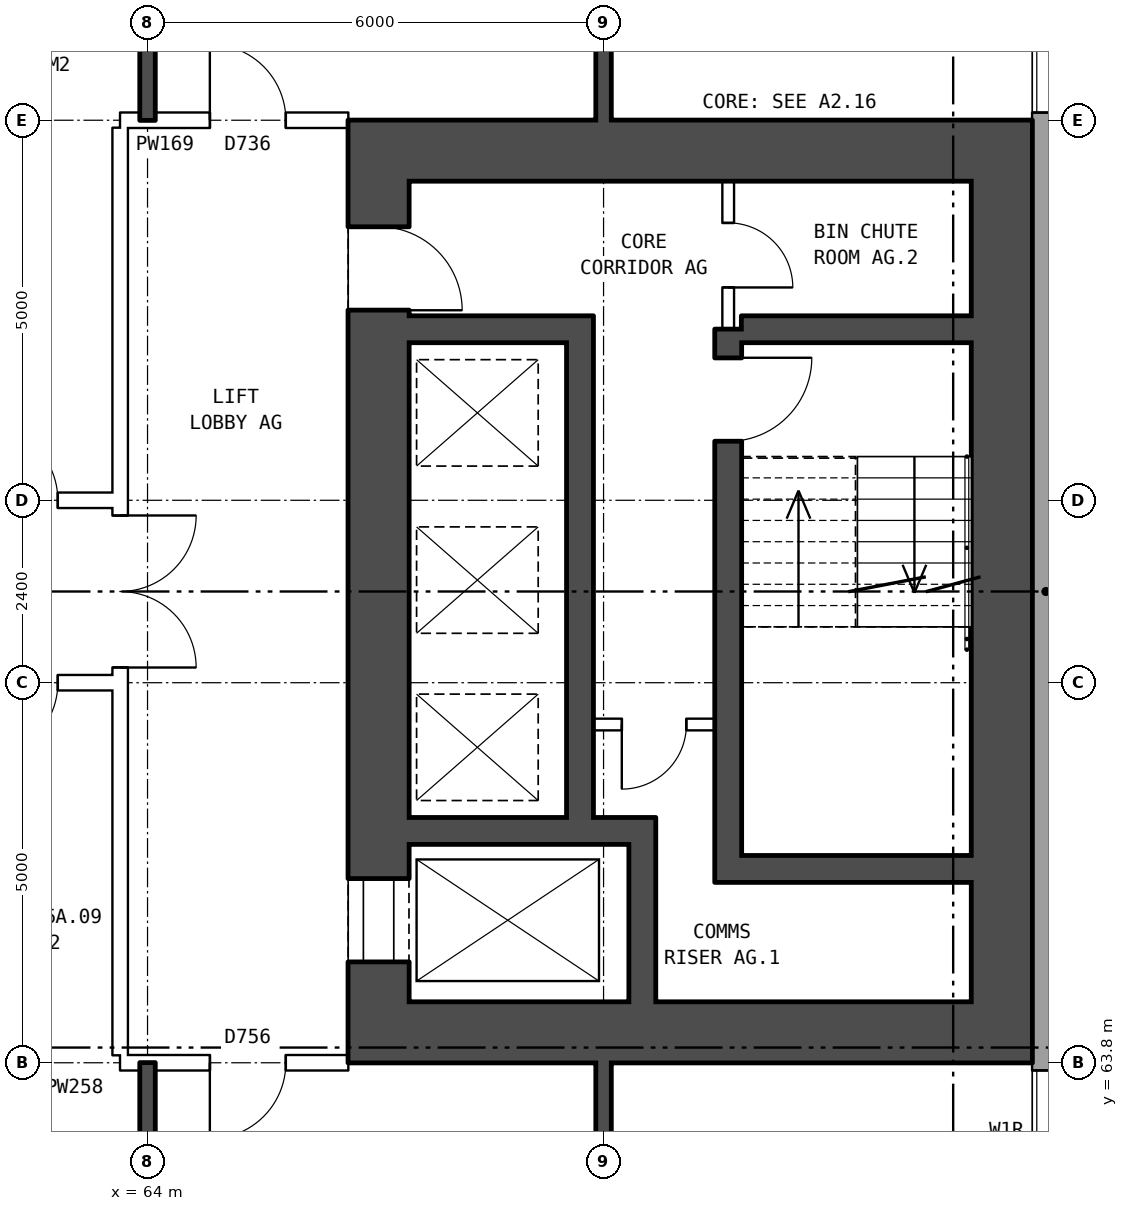
"""IFC4 building model, lengths in metres.
Left out: names, types, materials, properties, quantities, classifications, styles, units other than length and angle.
Written with IfcOpenShell. Run it as: python <this file> out.ifc"""

import sys

from ifc_helpers import new_model, si_unit, direction, frame, frame_2d, origin, place, context, subcontext, project, spatial, rectangle, extrude, element, fill, save


model = new_model("IFC4")
c1 = context("Model", 3, precision=1e-05, world=origin(), true_north=direction((0.0, 1.0)))
c2 = subcontext(c1, "Body", "Model", "MODEL_VIEW")
j1 = project(units=[si_unit("LENGTHUNIT", "METRE"), si_unit("PLANEANGLEUNIT", "RADIAN")], contexts=[c1])
p1 = place(None, origin())
s1 = spatial("IfcSite", under=j1, at=p1, CompositionType="ELEMENT")
p2 = place(p1, origin())
s2 = spatial("IfcBuilding", under=s1, at=p2, CompositionType="ELEMENT")
p3 = place(p2, frame((0.0, 0.0, 56.7)))
s3 = spatial("IfcBuildingStorey", under=s2, at=p3, CompositionType="ELEMENT", Elevation=56.7)
p4 = place(p3, frame((75.82, 57.075, 0.0), z_axis=(0.0, 0.0, 1.0), x_axis=(0.0, 1.0, 0.0)))
e1 = element("IfcWall", 1, at=p4, inside=s3, PredefinedType="STANDARD", context=c2, shape_type="SweptSolid", body=[
    extrude(rectangle(XDim=25.851, YDim=0.36, at=frame_2d((12.925, 0.0))), origin(), (0.0, 0.0, 1.0), 2.85),
])
p5 = place(p4, frame((1.075, 0.0, 0.8)))
e2 = element("IfcOpeningElement", 2, at=p5, cuts=e1, PredefinedType="OPENING", context=c2, shape_type="SweptSolid", body=[
    extrude(rectangle(XDim=1.2, YDim=1.8, at=frame_2d((0.6, 0.9))), frame((0.0, 0.19, 0.0), z_axis=(0.0, -1.0, 0.0), x_axis=(1.0, 0.0, 0.0)), (0.0, 0.0, 1.0), 0.38),
])
p6 = place(p4, frame((2.575, 0.0, 0.8)))
e3 = element("IfcOpeningElement", 3, at=p6, cuts=e1, PredefinedType="OPENING", context=c2, shape_type="SweptSolid", body=[
    extrude(rectangle(XDim=1.2, YDim=0.9, at=frame_2d((0.6, 0.45))), frame((0.0, 0.19, 0.0), z_axis=(0.0, -1.0, 0.0), x_axis=(1.0, 0.0, 0.0)), (0.0, 0.0, 1.0), 0.38),
])
p7 = place(p4, frame((19.225, 0.0, 1.7)))
e4 = element("IfcOpeningElement", 4, at=p7, cuts=e1, PredefinedType="OPENING", context=c2, shape_type="SweptSolid", body=[
    extrude(rectangle(XDim=1.6, YDim=0.9, at=frame_2d((0.8, 0.45))), frame((0.0, 0.19, 0.0), z_axis=(0.0, -1.0, 0.0), x_axis=(1.0, 0.0, 0.0)), (0.0, 0.0, 1.0), 0.38),
])
p8 = place(p4, frame((22.025, 0.0, 0.8)))
e5 = element("IfcOpeningElement", 5, at=p8, cuts=e1, PredefinedType="OPENING", context=c2, shape_type="SweptSolid", body=[
    extrude(rectangle(XDim=1.2, YDim=0.9, at=frame_2d((0.6, 0.45))), frame((0.0, 0.19, 0.0), z_axis=(0.0, -1.0, 0.0), x_axis=(1.0, 0.0, 0.0)), (0.0, 0.0, 1.0), 0.38),
])
p9 = place(p4, frame((5.025, 0.0, 1.7)))
e6 = element("IfcOpeningElement", 6, at=p9, cuts=e1, PredefinedType="OPENING", context=c2, shape_type="SweptSolid", body=[
    extrude(rectangle(XDim=1.6, YDim=0.9, at=frame_2d((0.8, 0.45))), frame((0.0, 0.19, 0.0), z_axis=(0.0, -1.0, 0.0), x_axis=(1.0, 0.0, 0.0)), (0.0, 0.0, 1.0), 0.38),
])
p10 = place(p4, frame((23.525, 0.0, 0.8)))
e7 = element("IfcOpeningElement", 7, at=p10, cuts=e1, PredefinedType="OPENING", context=c2, shape_type="SweptSolid", body=[
    extrude(rectangle(XDim=1.2, YDim=1.8, at=frame_2d((0.6, 0.9))), frame((0.0, 0.19, 0.0), z_axis=(0.0, -1.0, 0.0), x_axis=(1.0, 0.0, 0.0)), (0.0, 0.0, 1.0), 0.38),
])
p11 = place(p3, frame((67.04, 64.6, 0.0), z_axis=(0.0, 0.0, 1.0), x_axis=(0.0, 1.0, 0.0)))
e8 = element("IfcWall", 8, at=p11, inside=s3, PredefinedType="SHEAR", context=c2, shape_type="SweptSolid", body=[
    extrude(rectangle(XDim=10.8, YDim=0.8, at=frame_2d((5.4, 0.0))), origin(), (0.0, 0.0, 1.0), 2.85),
])
p12 = place(p11, frame((0.525, 0.0, 0.0)))
e9 = element("IfcOpeningElement", 9, at=p12, cuts=e8, PredefinedType="OPENING", context=c2, shape_type="SweptSolid", body=[
    extrude(rectangle(XDim=1.1, YDim=2.1, at=frame_2d((0.55, 1.05))), frame((0.0, 0.41, 0.0), z_axis=(0.0, -1.0, 0.0), x_axis=(1.0, 0.0, 0.0)), (0.0, 0.0, 1.0), 0.82),
])
p13 = place(p11, frame((9.1, 0.0, 0.0)))
e10 = element("IfcOpeningElement", 10, at=p13, cuts=e8, PredefinedType="OPENING", context=c2, shape_type="SweptSolid", body=[
    extrude(rectangle(XDim=1.1, YDim=2.1, at=frame_2d((0.55, 1.05))), frame((0.0, 0.41, 0.0), z_axis=(0.0, -1.0, 0.0), x_axis=(1.0, 0.0, 0.0)), (0.0, 0.0, 1.0), 0.82),
])
p14 = place(p3, frame((75.24, 64.6, 0.0), z_axis=(0.0, 0.0, 1.0), x_axis=(0.0, 1.0, 0.0)))
e11 = element("IfcWall", 11, at=p14, inside=s3, PredefinedType="SHEAR", context=c2, shape_type="SweptSolid", body=[
    extrude(rectangle(XDim=10.8, YDim=0.8, at=frame_2d((5.4, 0.0))), origin(), (0.0, 0.0, 1.0), 2.85),
])
for number, where, z_axis, x_axis in (
    (12, (66.64, 64.2, 0.0), (0.0, 0.0, 1.0), (1.0, 0.0, 0.0)),
    (13, (66.64, 75.8, 0.0), (0.0, 0.0, 1.0), (1.0, 0.0, 0.0)),
):
    element("IfcWall", number, at=place(p3, frame(where, z_axis=z_axis, x_axis=x_axis)), inside=s3, PredefinedType="SHEAR", context=c2, shape_type="SweptSolid", body=[
        extrude(rectangle(XDim=9.0, YDim=0.8, at=frame_2d((4.5, 0.0))), origin(), (0.0, 0.0, 1.0), 2.85),
    ])
p15 = place(p3, frame((71.815, 66.35, 0.0), z_axis=(0.0, 0.0, 1.0), x_axis=(1.0, 0.0, 0.0)))
e14 = element("IfcWall", 14, at=p15, inside=s3, PredefinedType="SHEAR", context=c2, shape_type="SweptSolid", body=[
    extrude(rectangle(XDim=3.025, YDim=0.35, at=frame_2d((1.513, 0.0))), origin(), (0.0, 0.0, 1.0), 2.85),
])
p16 = place(p3, frame((67.44, 66.85, 0.0), z_axis=(0.0, 0.0, 1.0), x_axis=(1.0, 0.0, 0.0)))
e15 = element("IfcWall", 15, at=p16, inside=s3, PredefinedType="SHEAR", context=c2, shape_type="SweptSolid", body=[
    extrude(rectangle(XDim=3.245, YDim=0.35, at=frame_2d((1.623, 0.0))), origin(), (0.0, 0.0, 1.0), 2.85),
])
p17 = place(p3, frame((69.865, 68.25, 0.0), z_axis=(0.0, 0.0, 1.0), x_axis=(1.0, 0.0, 0.0)))
e16 = element("IfcWall", 16, at=p17, inside=s3, PredefinedType="PARTITIONING", context=c2, shape_type="SweptSolid", body=[
    extrude(rectangle(XDim=1.6, YDim=0.15, at=frame_2d((0.8, 0.0))), origin(), (0.0, 0.0, 1.0), 2.85),
])
p18 = place(p17, frame((0.375, 0.0, 0.0)))
e17 = element("IfcOpeningElement", 17, at=p18, cuts=e16, PredefinedType="OPENING", context=c2, shape_type="SweptSolid", body=[
    extrude(rectangle(XDim=0.85, YDim=2.1, at=frame_2d((0.425, 1.05))), frame((0.0, 0.085, 0.0), z_axis=(0.0, -1.0, 0.0), x_axis=(1.0, 0.0, 0.0)), (0.0, 0.0, 1.0), 0.17),
])
p19 = place(p3, frame((67.44, 73.45, 0.0), z_axis=(0.0, 0.0, 1.0), x_axis=(1.0, 0.0, 0.0)))
e18 = element("IfcWall", 18, at=p19, inside=s3, PredefinedType="SHEAR", context=c2, shape_type="SweptSolid", body=[
    extrude(rectangle(XDim=2.075, YDim=0.35, at=frame_2d((1.038, 0.0))), origin(), (0.0, 0.0, 1.0), 2.85),
])
p20 = place(p3, frame((71.815, 73.45, 0.0), z_axis=(0.0, 0.0, 1.0), x_axis=(1.0, 0.0, 0.0)))
e19 = element("IfcWall", 19, at=p20, inside=s3, PredefinedType="SHEAR", context=c2, shape_type="SweptSolid", body=[
    extrude(rectangle(XDim=3.025, YDim=0.35, at=frame_2d((1.513, 0.0))), origin(), (0.0, 0.0, 1.0), 2.85),
])
p21 = place(p3, frame((69.69, 67.025, 0.0), z_axis=(0.0, 0.0, 1.0), x_axis=(0.0, 1.0, 0.0)))
e20 = element("IfcWall", 20, at=p21, inside=s3, PredefinedType="SHEAR", context=c2, shape_type="SweptSolid", body=[
    extrude(rectangle(XDim=6.6, YDim=0.35, at=frame_2d((3.3, 0.0))), origin(), (0.0, 0.0, 1.0), 2.85),
])
p22 = place(p3, frame((70.51, 64.6, 0.0), z_axis=(0.0, 0.0, 1.0), x_axis=(0.0, 1.0, 0.0)))
e21 = element("IfcWall", 21, at=p22, inside=s3, PredefinedType="SHEAR", context=c2, shape_type="SweptSolid", body=[
    extrude(rectangle(XDim=2.075, YDim=0.35, at=frame_2d((1.038, 0.0))), origin(), (0.0, 0.0, 1.0), 2.85),
])
p23 = place(p3, frame((71.64, 66.175, 0.0), z_axis=(0.0, 0.0, 1.0), x_axis=(0.0, 1.0, 0.0)))
e22 = element("IfcWall", 22, at=p23, inside=s3, PredefinedType="SHEAR", context=c2, shape_type="SweptSolid", body=[
    extrude(rectangle(XDim=7.275, YDim=0.35, at=frame_2d((3.637, 0.0))), origin(), (0.0, 0.0, 1.0), 2.85),
])
p24 = place(p23, frame((5.8, 0.0, 0.0)))
e23 = element("IfcOpeningElement", 23, at=p24, cuts=e22, PredefinedType="OPENING", context=c2, shape_type="SweptSolid", body=[
    extrude(rectangle(XDim=1.1, YDim=2.1, at=frame_2d((0.55, 1.05))), frame((0.0, 0.185, 0.0), z_axis=(0.0, -1.0, 0.0), x_axis=(1.0, 0.0, 0.0)), (0.0, 0.0, 1.0), 0.37),
])
p25 = place(p3, frame((71.64, 73.45, 0.0), z_axis=(0.0, 0.0, 1.0), x_axis=(0.0, 1.0, 0.0)))
e24 = element("IfcWall", 24, at=p25, inside=s3, PredefinedType="PARTITIONING", context=c2, shape_type="SweptSolid", body=[
    extrude(rectangle(XDim=1.95, YDim=0.15, at=frame_2d((0.975, 0.0))), origin(), (0.0, 0.0, 1.0), 2.85),
])
p26 = place(p25, frame((0.55, 0.0, 0.0)))
e25 = element("IfcOpeningElement", 25, at=p26, cuts=e24, PredefinedType="OPENING", context=c2, shape_type="SweptSolid", body=[
    extrude(rectangle(XDim=0.85, YDim=2.1, at=frame_2d((0.425, 1.05))), frame((0.0, 0.085, 0.0), z_axis=(0.0, -1.0, 0.0), x_axis=(1.0, 0.0, 0.0)), (0.0, 0.0, 1.0), 0.17),
])
p27 = place(p3, frame((63.64, 63.9, 0.0), z_axis=(0.0, 0.0, 1.0), x_axis=(0.0, 1.0, 0.0)))
e26 = element("IfcWall", 26, at=p27, inside=s3, PredefinedType="PARTITIONING", context=c2, shape_type="SweptSolid", body=[
    extrude(rectangle(XDim=12.2, YDim=0.2, at=frame_2d((6.1, 0.0))), origin(), (0.0, 0.0, 1.0), 2.85),
])
p28 = place(p27, frame((5.1, 0.0, 0.0)))
e27 = element("IfcOpeningElement", 27, at=p28, cuts=e26, PredefinedType="OPENING", context=c2, shape_type="SweptSolid", body=[
    extrude(rectangle(XDim=2.0, YDim=2.1, at=frame_2d((1.0, 1.05))), frame((0.0, 0.11, 0.0), z_axis=(0.0, -1.0, 0.0), x_axis=(1.0, 0.0, 0.0)), (0.0, 0.0, 1.0), 0.22),
])
p29 = place(p3, frame((63.64, 63.8, 0.0), z_axis=(0.0, 0.0, 1.0), x_axis=(1.0, 0.0, 0.0)))
e28 = element("IfcWall", 28, at=p29, inside=s3, PredefinedType="PARTITIONING", context=c2, shape_type="SweptSolid", body=[
    extrude(rectangle(XDim=3.0, YDim=0.2, at=frame_2d((1.5, 0.0))), origin(), (0.0, 0.0, 1.0), 2.85),
])
p30 = place(p29, frame((1.18, 0.0, 0.0)))
e29 = element("IfcOpeningElement", 29, at=p30, cuts=e28, PredefinedType="OPENING", context=c2, shape_type="SweptSolid", body=[
    extrude(rectangle(XDim=1.0, YDim=2.1, at=frame_2d((0.5, 1.05))), frame((0.0, 0.11, 0.0), z_axis=(0.0, -1.0, 0.0), x_axis=(1.0, 0.0, 0.0)), (0.0, 0.0, 1.0), 0.22),
])
p31 = place(p3, frame((44.36, 68.8, 0.0), z_axis=(0.0, 0.0, 1.0), x_axis=(1.0, 0.0, 0.0)))
e30 = element("IfcWall", 30, at=p31, inside=s3, PredefinedType="PARTITIONING", context=c2, shape_type="SweptSolid", body=[
    extrude(rectangle(XDim=19.28, YDim=0.2, at=frame_2d((9.64, 0.0))), origin(), (0.0, 0.0, 1.0), 2.85),
])
p32 = place(p31, frame((17.46, 0.0, 0.0)))
e31 = element("IfcOpeningElement", 31, at=p32, cuts=e30, PredefinedType="OPENING", context=c2, shape_type="SweptSolid", body=[
    extrude(rectangle(XDim=1.0, YDim=2.1, at=frame_2d((0.5, 1.05))), frame((0.0, 0.11, 0.0), z_axis=(0.0, -1.0, 0.0), x_axis=(1.0, 0.0, 0.0)), (0.0, 0.0, 1.0), 0.22),
])
p33 = place(p31, frame((11.64, 0.0, 0.0)))
e32 = element("IfcOpeningElement", 32, at=p33, cuts=e30, PredefinedType="OPENING", context=c2, shape_type="SweptSolid", body=[
    extrude(rectangle(XDim=1.0, YDim=2.1, at=frame_2d((0.5, 1.05))), frame((0.0, 0.11, 0.0), z_axis=(0.0, -1.0, 0.0), x_axis=(1.0, 0.0, 0.0)), (0.0, 0.0, 1.0), 0.22),
])
p34 = place(p31, frame((2.64, 0.0, 0.0)))
e33 = element("IfcOpeningElement", 33, at=p34, cuts=e30, PredefinedType="OPENING", context=c2, shape_type="SweptSolid", body=[
    extrude(rectangle(XDim=1.0, YDim=2.1, at=frame_2d((0.5, 1.05))), frame((0.0, 0.11, 0.0), z_axis=(0.0, -1.0, 0.0), x_axis=(1.0, 0.0, 0.0)), (0.0, 0.0, 1.0), 0.22),
])
p35 = place(p3, frame((44.36, 71.2, 0.0), z_axis=(0.0, 0.0, 1.0), x_axis=(1.0, 0.0, 0.0)))
e34 = element("IfcWall", 34, at=p35, inside=s3, PredefinedType="PARTITIONING", context=c2, shape_type="SweptSolid", body=[
    extrude(rectangle(XDim=19.28, YDim=0.2, at=frame_2d((9.64, 0.0))), origin(), (0.0, 0.0, 1.0), 2.85),
])
p36 = place(p35, frame((17.46, 0.0, 0.0)))
e35 = element("IfcOpeningElement", 35, at=p36, cuts=e34, PredefinedType="OPENING", context=c2, shape_type="SweptSolid", body=[
    extrude(rectangle(XDim=1.0, YDim=2.1, at=frame_2d((0.5, 1.05))), frame((0.0, 0.11, 0.0), z_axis=(0.0, -1.0, 0.0), x_axis=(1.0, 0.0, 0.0)), (0.0, 0.0, 1.0), 0.22),
])
p37 = place(p35, frame((8.64, 0.0, 0.0)))
e36 = element("IfcOpeningElement", 36, at=p37, cuts=e34, PredefinedType="OPENING", context=c2, shape_type="SweptSolid", body=[
    extrude(rectangle(XDim=1.0, YDim=2.1, at=frame_2d((0.5, 1.05))), frame((0.0, 0.11, 0.0), z_axis=(0.0, -1.0, 0.0), x_axis=(1.0, 0.0, 0.0)), (0.0, 0.0, 1.0), 0.22),
])
p38 = place(p35, frame((5.64, 0.0, 0.0)))
e37 = element("IfcOpeningElement", 37, at=p38, cuts=e34, PredefinedType="OPENING", context=c2, shape_type="SweptSolid", body=[
    extrude(rectangle(XDim=1.0, YDim=2.1, at=frame_2d((0.5, 1.05))), frame((0.0, 0.11, 0.0), z_axis=(0.0, -1.0, 0.0), x_axis=(1.0, 0.0, 0.0)), (0.0, 0.0, 1.0), 0.22),
])
p39 = place(p3, frame((63.64, 76.2, 0.0), z_axis=(0.0, 0.0, 1.0), x_axis=(1.0, 0.0, 0.0)))
e38 = element("IfcWall", 38, at=p39, inside=s3, PredefinedType="PARTITIONING", context=c2, shape_type="SweptSolid", body=[
    extrude(rectangle(XDim=3.0, YDim=0.2, at=frame_2d((1.5, 0.0))), origin(), (0.0, 0.0, 1.0), 2.85),
])
p40 = place(p39, frame((1.18, 0.0, 0.0)))
e39 = element("IfcOpeningElement", 39, at=p40, cuts=e38, PredefinedType="OPENING", context=c2, shape_type="SweptSolid", body=[
    extrude(rectangle(XDim=1.0, YDim=2.1, at=frame_2d((0.5, 1.05))), frame((0.0, 0.11, 0.0), z_axis=(0.0, -1.0, 0.0), x_axis=(1.0, 0.0, 0.0)), (0.0, 0.0, 1.0), 0.22),
])
for number, where, z_axis, x_axis in (
    (40, (64.0, 54.36, 0.0), (0.0, 0.0, 1.0), (0.0, 1.0, 0.0)),
    (41, (64.0, 76.2, 0.0), (0.0, 0.0, 1.0), (0.0, 1.0, 0.0)),
):
    element("IfcWall", number, at=place(p3, frame(where, z_axis=z_axis, x_axis=x_axis)), inside=s3, PredefinedType="SOLIDWALL", context=c2, shape_type="SweptSolid", body=[
        extrude(rectangle(XDim=9.44, YDim=0.2, at=frame_2d((4.72, 0.0))), origin(), (0.0, 0.0, 1.0), 2.85),
    ])
p41 = place(p3, frame((70.0, 54.36, 0.0), z_axis=(0.0, 0.0, 1.0), x_axis=(0.0, 1.0, 0.0)))
e42 = element("IfcWall", 42, at=p41, inside=s3, PredefinedType="SOLIDWALL", context=c2, shape_type="SweptSolid", body=[
    extrude(rectangle(XDim=9.44, YDim=0.2, at=frame_2d((4.72, 0.0))), origin(), (0.0, 0.0, 1.0), 2.85),
])
p42 = place(p41, frame((7.04, 0.0, 0.0)))
e43 = element("IfcOpeningElement", 43, at=p42, cuts=e42, PredefinedType="OPENING", context=c2, shape_type="SweptSolid", body=[
    extrude(rectangle(XDim=0.9, YDim=2.1, at=frame_2d((0.45, 1.05))), frame((0.0, 0.11, 0.0), z_axis=(0.0, -1.0, 0.0), x_axis=(1.0, 0.0, 0.0)), (0.0, 0.0, 1.0), 0.22),
])
p43 = place(p3, frame((70.0, 76.2, 0.0), z_axis=(0.0, 0.0, 1.0), x_axis=(0.0, 1.0, 0.0)))
e44 = element("IfcWall", 44, at=p43, inside=s3, PredefinedType="SOLIDWALL", context=c2, shape_type="SweptSolid", body=[
    extrude(rectangle(XDim=9.44, YDim=0.2, at=frame_2d((4.72, 0.0))), origin(), (0.0, 0.0, 1.0), 2.85),
])
p44 = place(p43, frame((7.17, 0.0, 0.0)))
e45 = element("IfcOpeningElement", 45, at=p44, cuts=e44, PredefinedType="OPENING", context=c2, shape_type="SweptSolid", body=[
    extrude(rectangle(XDim=0.9, YDim=2.1, at=frame_2d((0.45, 1.05))), frame((0.0, 0.11, 0.0), z_axis=(0.0, -1.0, 0.0), x_axis=(1.0, 0.0, 0.0)), (0.0, 0.0, 1.0), 0.22),
])
p45 = place(p43, frame((1.2, 0.0, 0.0)))
e46 = element("IfcOpeningElement", 46, at=p45, cuts=e44, PredefinedType="OPENING", context=c2, shape_type="SweptSolid", body=[
    extrude(rectangle(XDim=0.9, YDim=2.1, at=frame_2d((0.45, 1.05))), frame((0.0, 0.11, 0.0), z_axis=(0.0, -1.0, 0.0), x_axis=(1.0, 0.0, 0.0)), (0.0, 0.0, 1.0), 0.22),
])
p46 = place(p7, origin())
e47 = element("IfcWindow", 47, at=p46, inside=s3, PartitioningType="SINGLE_PANEL", PredefinedType="WINDOW", context=c2, shape_type="SweptSolid", body=[
    extrude(rectangle(XDim=1.6, YDim=0.9, at=frame_2d((0.8, 0.45))), frame((0.0, 0.15, 0.0), z_axis=(0.0, -1.0, 0.0), x_axis=(1.0, 0.0, 0.0)), (0.0, 0.0, 1.0), 0.06),
])
fill(e4, e47)
p47 = place(p12, origin())
e48 = element("IfcDoor", 48, at=p47, inside=s3, OperationType="DOUBLE_DOOR_SLIDING", PredefinedType="DOOR", context=c2, shape_type="SweptSolid", body=[
    extrude(rectangle(XDim=1.1, YDim=2.1, at=frame_2d((0.55, 1.05))), frame((0.0, -0.335, 0.0), z_axis=(0.0, -1.0, 0.0), x_axis=(1.0, 0.0, 0.0)), (0.0, 0.0, 1.0), 0.05),
])
fill(e9, e48)
p48 = place(p13, frame((1.1, 0.0, 0.0), z_axis=(0.0, 0.0, 1.0), x_axis=(-1.0, 0.0, 0.0)))
e49 = element("IfcDoor", 49, at=p48, inside=s3, OperationType="SINGLE_SWING_RIGHT", PredefinedType="DOOR", context=c2, shape_type="SweptSolid", body=[
    extrude(rectangle(XDim=1.1, YDim=2.1, at=frame_2d((0.55, 1.05))), frame((0.0, 0.385, 0.0), z_axis=(0.0, -1.0, 0.0), x_axis=(1.0, 0.0, 0.0)), (0.0, 0.0, 1.0), 0.05),
])
fill(e10, e49)
p49 = place(p24, frame((1.1, 0.0, 0.0), z_axis=(0.0, 0.0, 1.0), x_axis=(-1.0, 0.0, 0.0)))
e50 = element("IfcDoor", 50, at=p49, inside=s3, OperationType="SINGLE_SWING_LEFT", PredefinedType="DOOR", context=c2, shape_type="SweptSolid", body=[
    extrude(rectangle(XDim=1.1, YDim=2.1, at=frame_2d((0.55, 1.05))), frame((0.0, 0.025, 0.0), z_axis=(0.0, -1.0, 0.0), x_axis=(1.0, 0.0, 0.0)), (0.0, 0.0, 1.0), 0.05),
])
fill(e23, e50)
p50 = place(p18, frame((0.85, 0.0, 0.0), z_axis=(0.0, 0.0, 1.0), x_axis=(-1.0, 0.0, 0.0)))
e51 = element("IfcDoor", 51, at=p50, inside=s3, OperationType="SINGLE_SWING_RIGHT", PredefinedType="DOOR", context=c2, shape_type="SweptSolid", body=[
    extrude(rectangle(XDim=0.85, YDim=2.1, at=frame_2d((0.425, 1.05))), frame((0.0, 0.025, 0.0), z_axis=(0.0, -1.0, 0.0), x_axis=(1.0, 0.0, 0.0)), (0.0, 0.0, 1.0), 0.05),
])
fill(e17, e51)
p51 = place(p26, frame((0.85, 0.0, 0.0), z_axis=(0.0, 0.0, 1.0), x_axis=(-1.0, 0.0, 0.0)))
e52 = element("IfcDoor", 52, at=p51, inside=s3, OperationType="SINGLE_SWING_RIGHT", PredefinedType="DOOR", context=c2, shape_type="SweptSolid", body=[
    extrude(rectangle(XDim=0.85, YDim=2.1, at=frame_2d((0.425, 1.05))), frame((0.0, 0.025, 0.0), z_axis=(0.0, -1.0, 0.0), x_axis=(1.0, 0.0, 0.0)), (0.0, 0.0, 1.0), 0.05),
])
fill(e25, e52)
p52 = place(p28, frame((2.0, 0.0, 0.0), z_axis=(0.0, 0.0, 1.0), x_axis=(-1.0, 0.0, 0.0)))
e53 = element("IfcDoor", 53, at=p52, inside=s3, OperationType="DOUBLE_DOOR_SINGLE_SWING", PredefinedType="DOOR", context=c2, shape_type="SweptSolid", body=[
    extrude(rectangle(XDim=2.0, YDim=2.1, at=frame_2d((1.0, 1.05))), frame((0.0, 0.025, 0.0), z_axis=(0.0, -1.0, 0.0), x_axis=(1.0, 0.0, 0.0)), (0.0, 0.0, 1.0), 0.05),
])
fill(e27, e53)
p53 = place(p30, frame((1.0, 0.0, 0.0), z_axis=(0.0, 0.0, 1.0), x_axis=(-1.0, 0.0, 0.0)))
e54 = element("IfcDoor", 54, at=p53, inside=s3, OperationType="SINGLE_SWING_RIGHT", PredefinedType="DOOR", context=c2, shape_type="SweptSolid", body=[
    extrude(rectangle(XDim=1.0, YDim=2.1, at=frame_2d((0.5, 1.05))), frame((0.0, 0.025, 0.0), z_axis=(0.0, -1.0, 0.0), x_axis=(1.0, 0.0, 0.0)), (0.0, 0.0, 1.0), 0.05),
])
fill(e29, e54)
p54 = place(p40, origin())
e55 = element("IfcDoor", 55, at=p54, inside=s3, OperationType="SINGLE_SWING_LEFT", PredefinedType="DOOR", context=c2, shape_type="SweptSolid", body=[
    extrude(rectangle(XDim=1.0, YDim=2.1, at=frame_2d((0.5, 1.05))), frame((0.0, 0.025, 0.0), z_axis=(0.0, -1.0, 0.0), x_axis=(1.0, 0.0, 0.0)), (0.0, 0.0, 1.0), 0.05),
])
fill(e39, e55)
p55 = place(p32, frame((1.0, 0.0, 0.0), z_axis=(0.0, 0.0, 1.0), x_axis=(-1.0, 0.0, 0.0)))
e56 = element("IfcDoor", 56, at=p55, inside=s3, OperationType="SINGLE_SWING_RIGHT", PredefinedType="DOOR", context=c2, shape_type="SweptSolid", body=[
    extrude(rectangle(XDim=1.0, YDim=2.1, at=frame_2d((0.5, 1.05))), frame((0.0, 0.025, 0.0), z_axis=(0.0, -1.0, 0.0), x_axis=(1.0, 0.0, 0.0)), (0.0, 0.0, 1.0), 0.05),
])
fill(e31, e56)
p56 = place(p36, origin())
e57 = element("IfcDoor", 57, at=p56, inside=s3, OperationType="SINGLE_SWING_LEFT", PredefinedType="DOOR", context=c2, shape_type="SweptSolid", body=[
    extrude(rectangle(XDim=1.0, YDim=2.1, at=frame_2d((0.5, 1.05))), frame((0.0, 0.025, 0.0), z_axis=(0.0, -1.0, 0.0), x_axis=(1.0, 0.0, 0.0)), (0.0, 0.0, 1.0), 0.05),
])
fill(e35, e57)
p57 = place(p9, origin())
e58 = element("IfcWindow", 58, at=p57, inside=s3, PartitioningType="SINGLE_PANEL", PredefinedType="WINDOW", context=c2, shape_type="SweptSolid", body=[
    extrude(rectangle(XDim=1.6, YDim=0.9, at=frame_2d((0.8, 0.45))), frame((0.0, 0.15, 0.0), z_axis=(0.0, -1.0, 0.0), x_axis=(1.0, 0.0, 0.0)), (0.0, 0.0, 1.0), 0.06),
])
fill(e6, e58)
save(model, sys.argv[1])
